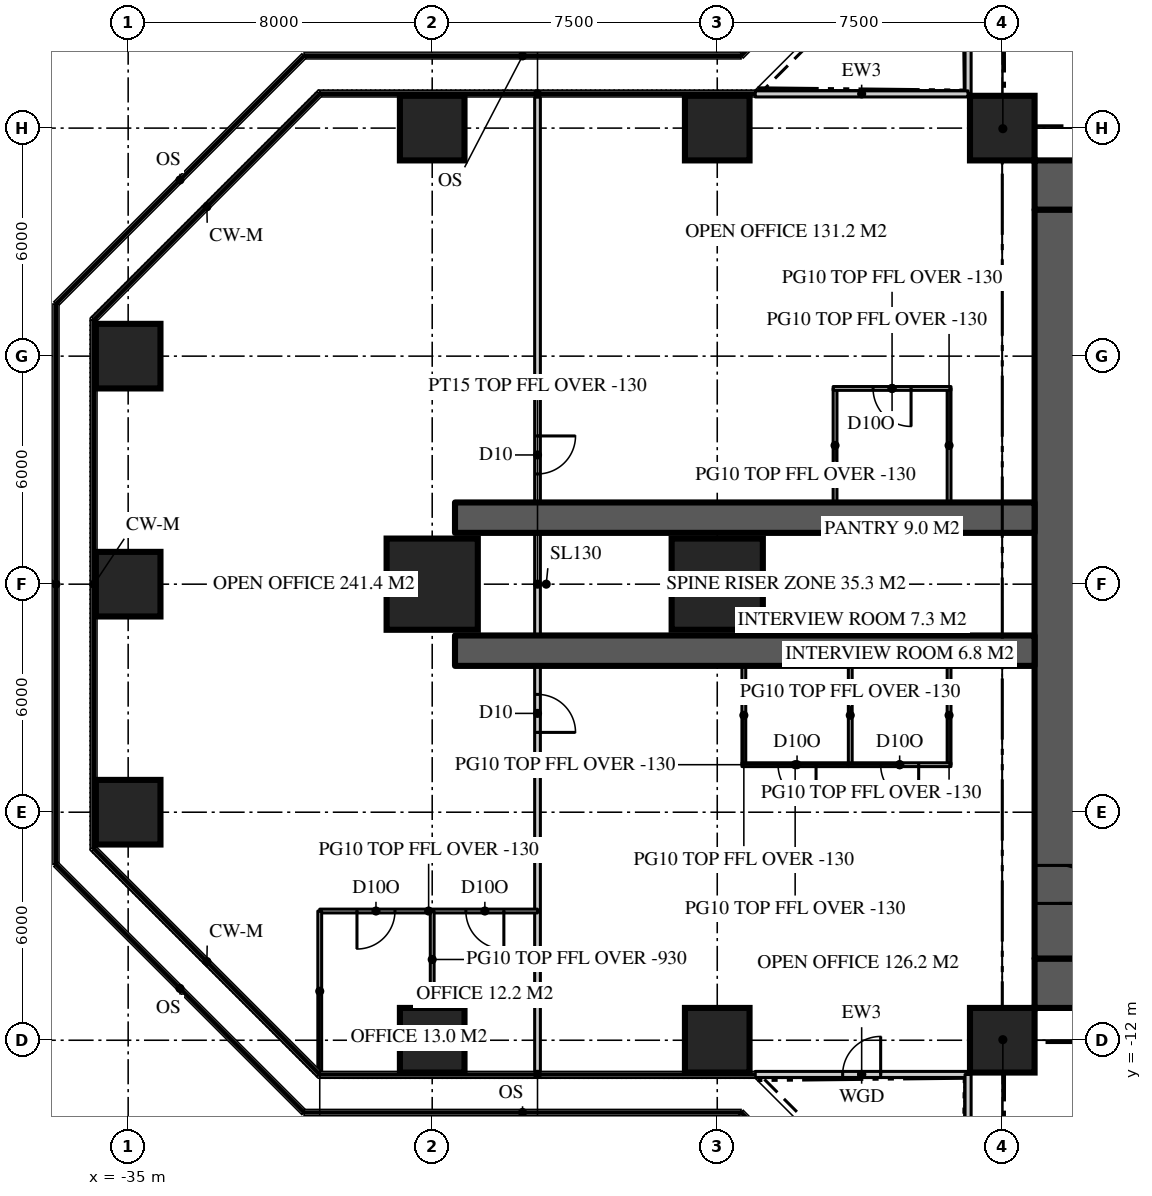
"""IFC4 building model, lengths in metres.
Left out: names, types, materials, properties, quantities, classifications, styles, units other than length and angle.
Written with IfcOpenShell. Run it as: python <this file> out.ifc"""

import sys

from ifc_helpers import new_model, si_unit, direction, frame, frame_2d, origin, origin_2d, place, context, subcontext, project, spatial, rectangle, extrude, element, fill, save


model = new_model("IFC4")
c1 = context("Model", 3, precision=1e-05, world=origin(), true_north=direction((0.0, 1.0)))
c2 = subcontext(c1, "Body", "Model", "MODEL_VIEW")
j1 = project(units=[si_unit("LENGTHUNIT", "METRE"), si_unit("PLANEANGLEUNIT", "RADIAN")], contexts=[c1])
p1 = place(None, origin())
s1 = spatial("IfcSite", under=j1, at=p1, CompositionType="ELEMENT")
p2 = place(p1, origin())
s2 = spatial("IfcBuilding", under=s1, at=p2, CompositionType="ELEMENT")
p3 = place(p2, frame((0.0, 0.0, 135.9)))
s3 = spatial("IfcBuildingStorey", under=s2, at=p3, CompositionType="ELEMENT", Elevation=135.9)
p4 = place(p3, frame((-11.15, 10.5, 0.0), z_axis=(0.0, 0.0, 1.0), x_axis=(1.0, 0.0, 0.0)))
e1 = element("IfcWall", 1, at=p4, inside=s3, PredefinedType="SHEAR", context=c2, shape_type="SweptSolid", body=[
    extrude(rectangle(XDim=22.3, YDim=1.3, at=frame_2d((11.15, 0.0))), origin(), (0.0, 0.0, 1.0), 3.9),
])
p5 = place(p4, frame((4.25, 0.0, 0.0)))
e2 = element("IfcOpeningElement", 2, at=p5, cuts=e1, PredefinedType="OPENING", context=c2, shape_type="SweptSolid", body=[
    extrude(rectangle(XDim=1.8, YDim=2.2, at=frame_2d((0.9, 1.1))), frame((0.0, 0.66, 0.0), z_axis=(0.0, -1.0, 0.0), x_axis=(1.0, 0.0, 0.0)), (0.0, 0.0, 1.0), 1.32),
])
p6 = place(p4, frame((16.25, 0.0, 0.0)))
e3 = element("IfcOpeningElement", 3, at=p6, cuts=e1, PredefinedType="OPENING", context=c2, shape_type="SweptSolid", body=[
    extrude(rectangle(XDim=1.8, YDim=2.2, at=frame_2d((0.9, 1.1))), frame((0.0, 0.66, 0.0), z_axis=(0.0, -1.0, 0.0), x_axis=(1.0, 0.0, 0.0)), (0.0, 0.0, 1.0), 1.32),
])
p7 = place(p3, frame((11.15, -10.5, 0.0), z_axis=(0.0, 0.0, 1.0), x_axis=(-1.0, 0.0, 0.0)))
e4 = element("IfcWall", 4, at=p7, inside=s3, PredefinedType="SHEAR", context=c2, shape_type="SweptSolid", body=[
    extrude(rectangle(XDim=22.3, YDim=1.3, at=frame_2d((11.15, 0.0))), origin(), (0.0, 0.0, 1.0), 3.9),
])
p8 = place(p7, frame((16.25, 0.0, 0.0)))
e5 = element("IfcOpeningElement", 5, at=p8, cuts=e4, PredefinedType="OPENING", context=c2, shape_type="SweptSolid", body=[
    extrude(rectangle(XDim=1.8, YDim=2.2, at=frame_2d((0.9, 1.1))), frame((0.0, 0.66, 0.0), z_axis=(0.0, -1.0, 0.0), x_axis=(1.0, 0.0, 0.0)), (0.0, 0.0, 1.0), 1.32),
])
p9 = place(p7, frame((4.25, 0.0, 0.0)))
e6 = element("IfcOpeningElement", 6, at=p9, cuts=e4, PredefinedType="OPENING", context=c2, shape_type="SweptSolid", body=[
    extrude(rectangle(XDim=1.8, YDim=2.2, at=frame_2d((0.9, 1.1))), frame((0.0, 0.66, 0.0), z_axis=(0.0, -1.0, 0.0), x_axis=(1.0, 0.0, 0.0)), (0.0, 0.0, 1.0), 1.32),
])
p10 = place(p3, frame((-10.5, 9.85, 0.0), z_axis=(0.0, 0.0, 1.0), x_axis=(0.0, -1.0, 0.0)))
e7 = element("IfcWall", 7, at=p10, inside=s3, PredefinedType="SHEAR", context=c2, shape_type="SweptSolid", body=[
    extrude(rectangle(XDim=19.7, YDim=1.3, at=frame_2d((9.85, 0.0))), origin(), (0.0, 0.0, 1.0), 3.9),
])
p11 = place(p10, frame((17.25, 0.0, 0.0)))
e8 = element("IfcOpeningElement", 8, at=p11, cuts=e7, PredefinedType="OPENING", context=c2, shape_type="SweptSolid", body=[
    extrude(rectangle(XDim=1.0, YDim=2.2, at=frame_2d((0.5, 1.1))), frame((0.0, 0.66, 0.0), z_axis=(0.0, -1.0, 0.0), x_axis=(1.0, 0.0, 0.0)), (0.0, 0.0, 1.0), 1.32),
])
for number, where, z_axis, x_axis in (
    (9, (-11.15, 1.75, 0.0), (0.0, 0.0, 1.0), (-1.0, 0.0, 0.0)),
    (10, (-11.15, -1.75, 0.0), (0.0, 0.0, 1.0), (-1.0, 0.0, 0.0)),
):
    element("IfcWall", number, at=place(p3, frame(where, z_axis=z_axis, x_axis=x_axis)), inside=s3, PredefinedType="SHEAR", context=c2, shape_type="SweptSolid", body=[
        extrude(rectangle(XDim=15.25, YDim=0.8, at=frame_2d((7.625, 0.0))), origin(), (0.0, 0.0, 1.0), 3.9),
    ])
for number, where, z_axis, x_axis in (
    (11, (-27.0, -12.0, 0.0), (0.0, 0.0, 1.0), (1.0, 0.0, 0.0)),
    (12, (-19.5, -12.0, 0.0), (0.0, 0.0, 1.0), (1.0, 0.0, 0.0)),
    (13, (-12.0, -12.0, 0.0), (0.0, 0.0, 1.0), (1.0, 0.0, 0.0)),
    (14, (-35.0, -6.0, 0.0), (0.0, 0.0, 1.0), (1.0, 0.0, 0.0)),
    (15, (-35.0, 0.0, 0.0), (0.0, 0.0, 1.0), (1.0, 0.0, 0.0)),
):
    element("IfcColumn", number, at=place(p3, frame(where, z_axis=z_axis, x_axis=x_axis)), inside=s3, PredefinedType="COLUMN", context=c2, shape_type="SweptSolid", body=[
        extrude(rectangle(XDim=1.7, YDim=1.7, at=origin_2d()), origin(), (0.0, 0.0, 1.0), 3.9),
    ])
for number, where, z_axis, x_axis in (
    (16, (-27.0, 0.0, 0.0), (0.0, 0.0, 1.0), (1.0, 0.0, 0.0)),
    (17, (-19.5, 0.0, 0.0), (0.0, 0.0, 1.0), (1.0, 0.0, 0.0)),
):
    element("IfcColumn", number, at=place(p3, frame(where, z_axis=z_axis, x_axis=x_axis)), inside=s3, PredefinedType="COLUMN", context=c2, shape_type="SweptSolid", body=[
        extrude(rectangle(XDim=2.4, YDim=2.4, at=origin_2d()), origin(), (0.0, 0.0, 1.0), 3.9),
    ])
for number, where, z_axis, x_axis in (
    (18, (-35.0, 6.0, 0.0), (0.0, 0.0, 1.0), (1.0, 0.0, 0.0)),
    (19, (-27.0, 12.0, 0.0), (0.0, 0.0, 1.0), (1.0, 0.0, 0.0)),
    (20, (-19.5, 12.0, 0.0), (0.0, 0.0, 1.0), (1.0, 0.0, 0.0)),
    (21, (-12.0, 12.0, 0.0), (0.0, 0.0, 1.0), (1.0, 0.0, 0.0)),
):
    element("IfcColumn", number, at=place(p3, frame(where, z_axis=z_axis, x_axis=x_axis)), inside=s3, PredefinedType="COLUMN", context=c2, shape_type="SweptSolid", body=[
        extrude(rectangle(XDim=1.7, YDim=1.7, at=origin_2d()), origin(), (0.0, 0.0, 1.0), 3.9),
    ])
p12 = place(p3, frame((-12.9, 18.5, 0.0), z_axis=(0.0, 0.0, 1.0), x_axis=(0.0, -1.0, 0.0)))
e22 = element("IfcWall", 22, at=p12, inside=s3, PredefinedType="SOLIDWALL", context=c2, shape_type="SweptSolid", body=[
    extrude(rectangle(XDim=5.6, YDim=0.16, at=frame_2d((2.8, 0.0))), origin(), (0.0, 0.0, 1.0), 3.77),
])
p13 = place(p12, frame((2.3, 0.0, 0.0)))
e23 = element("IfcOpeningElement", 23, at=p13, cuts=e22, PredefinedType="OPENING", context=c2, shape_type="SweptSolid", body=[
    extrude(rectangle(XDim=1.0, YDim=2.2, at=frame_2d((0.5, 1.1))), frame((0.0, 0.09, 0.0), z_axis=(0.0, -1.0, 0.0), x_axis=(1.0, 0.0, 0.0)), (0.0, 0.0, 1.0), 0.18),
])
p14 = place(p3, frame((-12.9, 12.9, 0.0), z_axis=(0.0, 0.0, 1.0), x_axis=(-1.0, 0.0, 0.0)))
e24 = element("IfcWall", 24, at=p14, inside=s3, PredefinedType="SOLIDWALL", context=c2, shape_type="SweptSolid", body=[
    extrude(rectangle(XDim=5.6, YDim=0.16, at=frame_2d((2.8, 0.0))), origin(), (0.0, 0.0, 1.0), 3.77),
])
p15 = place(p3, frame((-18.5, -12.9, 0.0), z_axis=(0.0, 0.0, 1.0), x_axis=(1.0, 0.0, 0.0)))
e25 = element("IfcWall", 25, at=p15, inside=s3, PredefinedType="SOLIDWALL", context=c2, shape_type="SweptSolid", body=[
    extrude(rectangle(XDim=5.6, YDim=0.16, at=frame_2d((2.8, 0.0))), origin(), (0.0, 0.0, 1.0), 3.77),
])
p16 = place(p15, frame((2.3, 0.0, 0.0)))
e26 = element("IfcOpeningElement", 26, at=p16, cuts=e25, PredefinedType="OPENING", context=c2, shape_type="SweptSolid", body=[
    extrude(rectangle(XDim=1.0, YDim=2.2, at=frame_2d((0.5, 1.1))), frame((0.0, 0.09, 0.0), z_axis=(0.0, -1.0, 0.0), x_axis=(1.0, 0.0, 0.0)), (0.0, 0.0, 1.0), 0.18),
])
p17 = place(p3, frame((-12.9, -12.9, 0.0), z_axis=(0.0, 0.0, 1.0), x_axis=(0.0, -1.0, 0.0)))
e27 = element("IfcWall", 27, at=p17, inside=s3, PredefinedType="SOLIDWALL", context=c2, shape_type="SweptSolid", body=[
    extrude(rectangle(XDim=5.6, YDim=0.16, at=frame_2d((2.8, 0.0))), origin(), (0.0, 0.0, 1.0), 3.77),
])
p18 = place(p3, frame((-24.229, 12.82, 0.0), z_axis=(0.0, 0.0, 1.0), x_axis=(0.0, -1.0, 0.0)))
e28 = element("IfcWall", 28, at=p18, inside=s3, PredefinedType="PARTITIONING", context=c2, shape_type="SweptSolid", body=[
    extrude(rectangle(XDim=25.64, YDim=0.15, at=frame_2d((12.82, 0.0))), origin(), (0.0, 0.0, 1.0), 3.77),
])
p19 = place(p18, frame((15.72, 0.0, 0.0)))
e29 = element("IfcOpeningElement", 29, at=p19, cuts=e28, PredefinedType="OPENING", context=c2, shape_type="SweptSolid", body=[
    extrude(rectangle(XDim=1.0, YDim=2.2, at=frame_2d((0.5, 1.1))), frame((0.0, 0.085, 0.0), z_axis=(0.0, -1.0, 0.0), x_axis=(1.0, 0.0, 0.0)), (0.0, 0.0, 1.0), 0.17),
])
p20 = place(p18, frame((8.92, 0.0, 0.0)))
e30 = element("IfcOpeningElement", 30, at=p20, cuts=e28, PredefinedType="OPENING", context=c2, shape_type="SweptSolid", body=[
    extrude(rectangle(XDim=1.0, YDim=2.2, at=frame_2d((0.5, 1.1))), frame((0.0, 0.085, 0.0), z_axis=(0.0, -1.0, 0.0), x_axis=(1.0, 0.0, 0.0)), (0.0, 0.0, 1.0), 0.17),
])
p21 = place(p3, frame((-24.229, -8.6, 0.0), z_axis=(0.0, 0.0, 1.0), x_axis=(-1.0, 0.0, 0.0)))
e31 = element("IfcWall", 31, at=p21, inside=s3, PredefinedType="PARTITIONING", context=c2, shape_type="SweptSolid", body=[
    extrude(rectangle(XDim=5.73, YDim=0.1, at=frame_2d((2.865, 0.0))), origin(), (0.0, 0.0, 1.0), 3.77),
])
p22 = place(p21, frame((0.885, 0.0, 0.0)))
e32 = element("IfcOpeningElement", 32, at=p22, cuts=e31, PredefinedType="OPENING", context=c2, shape_type="SweptSolid", body=[
    extrude(rectangle(XDim=1.0, YDim=2.2, at=frame_2d((0.5, 1.1))), frame((0.0, 0.06, 0.0), z_axis=(0.0, -1.0, 0.0), x_axis=(1.0, 0.0, 0.0)), (0.0, 0.0, 1.0), 0.12),
])
p23 = place(p21, frame((3.75, 0.0, 0.0)))
e33 = element("IfcOpeningElement", 33, at=p23, cuts=e31, PredefinedType="OPENING", context=c2, shape_type="SweptSolid", body=[
    extrude(rectangle(XDim=1.0, YDim=2.2, at=frame_2d((0.5, 1.1))), frame((0.0, 0.06, 0.0), z_axis=(0.0, -1.0, 0.0), x_axis=(1.0, 0.0, 0.0)), (0.0, 0.0, 1.0), 0.12),
])
p24 = place(p3, frame((-27.0, -8.6, 0.0), z_axis=(0.0, 0.0, 1.0), x_axis=(0.0, -1.0, 0.0)))
e34 = element("IfcWall", 34, at=p24, inside=s3, PredefinedType="PARTITIONING", context=c2, shape_type="SweptSolid", body=[
    extrude(rectangle(XDim=2.55, YDim=0.1, at=frame_2d((1.275, 0.0))), origin(), (0.0, 0.0, 1.0), 2.97),
])
p25 = place(p3, frame((-29.959, -8.6, 0.0), z_axis=(0.0, 0.0, 1.0), x_axis=(0.0, -1.0, 0.0)))
e35 = element("IfcWall", 35, at=p25, inside=s3, PredefinedType="PARTITIONING", context=c2, shape_type="SweptSolid", body=[
    extrude(rectangle(XDim=4.22, YDim=0.1, at=frame_2d((2.11, 0.0))), origin(), (0.0, 0.0, 1.0), 3.77),
])
for number, where, z_axis, x_axis in (
    (36, (-13.4, -2.15, 0.0), (0.0, 0.0, 1.0), (0.0, -1.0, 0.0)),
    (37, (-16.0, -2.15, 0.0), (0.0, 0.0, 1.0), (0.0, -1.0, 0.0)),
):
    element("IfcWall", number, at=place(p3, frame(where, z_axis=z_axis, x_axis=x_axis)), inside=s3, PredefinedType="PARTITIONING", context=c2, shape_type="SweptSolid", body=[
        extrude(rectangle(XDim=2.6, YDim=0.1, at=frame_2d((1.3, 0.0))), origin(), (0.0, 0.0, 1.0), 3.77),
    ])
p26 = place(p3, frame((-13.35, -4.75, 0.0), z_axis=(0.0, 0.0, 1.0), x_axis=(-1.0, 0.0, 0.0)))
e38 = element("IfcWall", 38, at=p26, inside=s3, PredefinedType="PARTITIONING", context=c2, shape_type="SweptSolid", body=[
    extrude(rectangle(XDim=2.7, YDim=0.1, at=frame_2d((1.35, 0.0))), origin(), (0.0, 0.0, 1.0), 3.77),
])
p27 = place(p26, frame((0.85, 0.0, 0.0)))
e39 = element("IfcOpeningElement", 39, at=p27, cuts=e38, PredefinedType="OPENING", context=c2, shape_type="SweptSolid", body=[
    extrude(rectangle(XDim=1.0, YDim=2.2, at=frame_2d((0.5, 1.1))), frame((0.0, 0.06, 0.0), z_axis=(0.0, -1.0, 0.0), x_axis=(1.0, 0.0, 0.0)), (0.0, 0.0, 1.0), 0.12),
])
p28 = place(p3, frame((-18.8, -2.15, 0.0), z_axis=(0.0, 0.0, 1.0), x_axis=(0.0, -1.0, 0.0)))
e40 = element("IfcWall", 40, at=p28, inside=s3, PredefinedType="PARTITIONING", context=c2, shape_type="SweptSolid", body=[
    extrude(rectangle(XDim=2.6, YDim=0.1, at=frame_2d((1.3, 0.0))), origin(), (0.0, 0.0, 1.0), 3.77),
])
p29 = place(p3, frame((-16.05, -4.75, 0.0), z_axis=(0.0, 0.0, 1.0), x_axis=(-1.0, 0.0, 0.0)))
e41 = element("IfcWall", 41, at=p29, inside=s3, PredefinedType="PARTITIONING", context=c2, shape_type="SweptSolid", body=[
    extrude(rectangle(XDim=2.8, YDim=0.1, at=frame_2d((1.4, 0.0))), origin(), (0.0, 0.0, 1.0), 3.77),
])
p30 = place(p29, frame((0.85, 0.0, 0.0)))
e42 = element("IfcOpeningElement", 42, at=p30, cuts=e41, PredefinedType="OPENING", context=c2, shape_type="SweptSolid", body=[
    extrude(rectangle(XDim=1.0, YDim=2.2, at=frame_2d((0.5, 1.1))), frame((0.0, 0.06, 0.0), z_axis=(0.0, -1.0, 0.0), x_axis=(1.0, 0.0, 0.0)), (0.0, 0.0, 1.0), 0.12),
])
for number, where, z_axis, x_axis in (
    (43, (-13.4, 2.15, 0.0), (0.0, 0.0, 1.0), (0.0, 1.0, 0.0)),
    (44, (-16.4, 2.15, 0.0), (0.0, 0.0, 1.0), (0.0, 1.0, 0.0)),
):
    element("IfcWall", number, at=place(p3, frame(where, z_axis=z_axis, x_axis=x_axis)), inside=s3, PredefinedType="PARTITIONING", context=c2, shape_type="SweptSolid", body=[
        extrude(rectangle(XDim=3.0, YDim=0.1, at=frame_2d((1.5, 0.0))), origin(), (0.0, 0.0, 1.0), 3.77),
    ])
p31 = place(p3, frame((-13.35, 5.15, 0.0), z_axis=(0.0, 0.0, 1.0), x_axis=(-1.0, 0.0, 0.0)))
e45 = element("IfcWall", 45, at=p31, inside=s3, PredefinedType="PARTITIONING", context=c2, shape_type="SweptSolid", body=[
    extrude(rectangle(XDim=3.1, YDim=0.1, at=frame_2d((1.55, 0.0))), origin(), (0.0, 0.0, 1.0), 3.77),
])
p32 = place(p31, frame((1.05, 0.0, 0.0)))
e46 = element("IfcOpeningElement", 46, at=p32, cuts=e45, PredefinedType="OPENING", context=c2, shape_type="SweptSolid", body=[
    extrude(rectangle(XDim=1.0, YDim=2.2, at=frame_2d((0.5, 1.1))), frame((0.0, 0.06, 0.0), z_axis=(0.0, -1.0, 0.0), x_axis=(1.0, 0.0, 0.0)), (0.0, 0.0, 1.0), 0.12),
])
for number, where, z_axis, x_axis in (
    (47, (-11.15, 11.15, 0.0), (0.0, 0.0, 1.0), (-0.707, 0.707, 0.0)),
    (48, (-11.15, -11.15, 0.0), (0.0, 0.0, 1.0), (-0.707, -0.707, 0.0)),
):
    element("IfcWall", number, at=place(p3, frame(where, z_axis=z_axis, x_axis=x_axis)), inside=s3, PredefinedType="PARTITIONING", context=c2, shape_type="SweptSolid", body=[
        extrude(rectangle(XDim=2.362, YDim=0.15, at=frame_2d((1.181, 0.0))), origin(), (0.0, 0.0, 1.0), 3.22),
    ])
p33 = place(p16, origin())
e49 = element("IfcDoor", 49, at=p33, inside=s3, OperationType="SINGLE_SWING_RIGHT", PredefinedType="DOOR", context=c2, shape_type="SweptSolid", body=[
    extrude(rectangle(XDim=1.0, YDim=2.2, at=frame_2d((0.5, 1.1))), frame((0.0, 0.025, 0.0), z_axis=(0.0, -1.0, 0.0), x_axis=(1.0, 0.0, 0.0)), (0.0, 0.0, 1.0), 0.05),
])
fill(e26, e49)
p34 = place(p11, origin())
e50 = element("IfcDoor", 50, at=p34, inside=s3, OperationType="SINGLE_SWING_RIGHT", PredefinedType="DOOR", context=c2, shape_type="SweptSolid", body=[
    extrude(rectangle(XDim=1.0, YDim=2.2, at=frame_2d((0.5, 1.1))), frame((0.0, 0.025, 0.0), z_axis=(0.0, -1.0, 0.0), x_axis=(1.0, 0.0, 0.0)), (0.0, 0.0, 1.0), 0.05),
])
fill(e8, e50)
p35 = place(p19, origin())
e51 = element("IfcDoor", 51, at=p35, inside=s3, OperationType="SINGLE_SWING_RIGHT", PredefinedType="DOOR", context=c2, shape_type="SweptSolid", body=[
    extrude(rectangle(XDim=1.0, YDim=2.2, at=frame_2d((0.5, 1.1))), frame((0.0, 0.025, 0.0), z_axis=(0.0, -1.0, 0.0), x_axis=(1.0, 0.0, 0.0)), (0.0, 0.0, 1.0), 0.05),
])
fill(e29, e51)
p36 = place(p20, origin())
e52 = element("IfcDoor", 52, at=p36, inside=s3, OperationType="SINGLE_SWING_LEFT", PredefinedType="DOOR", context=c2, shape_type="SweptSolid", body=[
    extrude(rectangle(XDim=1.0, YDim=2.2, at=frame_2d((0.5, 1.1))), frame((0.0, 0.025, 0.0), z_axis=(0.0, -1.0, 0.0), x_axis=(1.0, 0.0, 0.0)), (0.0, 0.0, 1.0), 0.05),
])
fill(e30, e52)
p37 = place(p22, origin())
e53 = element("IfcDoor", 53, at=p37, inside=s3, OperationType="SINGLE_SWING_LEFT", PredefinedType="DOOR", context=c2, shape_type="SweptSolid", body=[
    extrude(rectangle(XDim=1.0, YDim=2.2, at=frame_2d((0.5, 1.1))), frame((0.0, 0.025, 0.0), z_axis=(0.0, -1.0, 0.0), x_axis=(1.0, 0.0, 0.0)), (0.0, 0.0, 1.0), 0.05),
])
fill(e32, e53)
p38 = place(p23, origin())
e54 = element("IfcDoor", 54, at=p38, inside=s3, OperationType="SINGLE_SWING_RIGHT", PredefinedType="DOOR", context=c2, shape_type="SweptSolid", body=[
    extrude(rectangle(XDim=1.0, YDim=2.2, at=frame_2d((0.5, 1.1))), frame((0.0, 0.025, 0.0), z_axis=(0.0, -1.0, 0.0), x_axis=(1.0, 0.0, 0.0)), (0.0, 0.0, 1.0), 0.05),
])
fill(e33, e54)
p39 = place(p27, origin())
e55 = element("IfcDoor", 55, at=p39, inside=s3, OperationType="SINGLE_SWING_LEFT", PredefinedType="DOOR", context=c2, shape_type="SweptSolid", body=[
    extrude(rectangle(XDim=1.0, YDim=2.2, at=frame_2d((0.5, 1.1))), frame((0.0, 0.025, 0.0), z_axis=(0.0, -1.0, 0.0), x_axis=(1.0, 0.0, 0.0)), (0.0, 0.0, 1.0), 0.05),
])
fill(e39, e55)
p40 = place(p30, origin())
e56 = element("IfcDoor", 56, at=p40, inside=s3, OperationType="SINGLE_SWING_LEFT", PredefinedType="DOOR", context=c2, shape_type="SweptSolid", body=[
    extrude(rectangle(XDim=1.0, YDim=2.2, at=frame_2d((0.5, 1.1))), frame((0.0, 0.025, 0.0), z_axis=(0.0, -1.0, 0.0), x_axis=(1.0, 0.0, 0.0)), (0.0, 0.0, 1.0), 0.05),
])
fill(e42, e56)
p41 = place(p32, origin())
e57 = element("IfcDoor", 57, at=p41, inside=s3, OperationType="SINGLE_SWING_LEFT", PredefinedType="DOOR", context=c2, shape_type="SweptSolid", body=[
    extrude(rectangle(XDim=1.0, YDim=2.2, at=frame_2d((0.5, 1.1))), frame((0.0, 0.025, 0.0), z_axis=(0.0, -1.0, 0.0), x_axis=(1.0, 0.0, 0.0)), (0.0, 0.0, 1.0), 0.05),
])
fill(e46, e57)
save(model, sys.argv[1])
